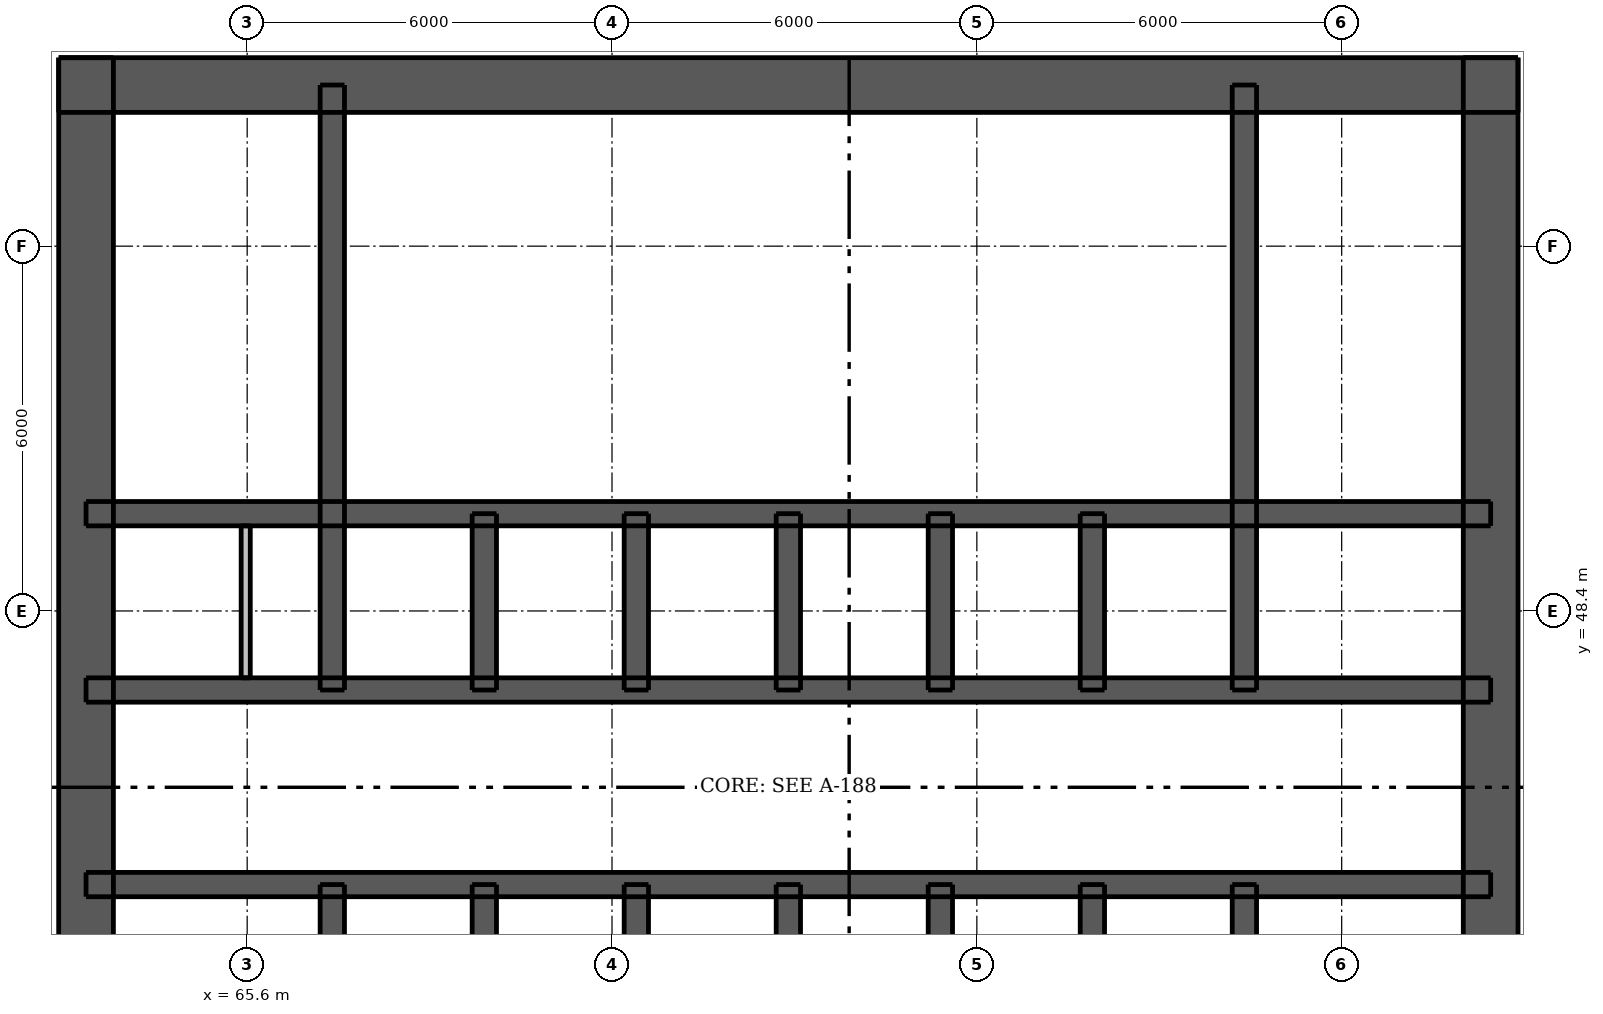
"""IFC4 building model, lengths in metres.
Left out: names, types, materials, properties, quantities, classifications, styles, units other than length and angle.
Written with IfcOpenShell. Run it as: python <this file> out.ifc"""

import sys

from ifc_helpers import new_model, si_unit, direction, frame, frame_2d, origin, place, context, subcontext, project, spatial, rectangle, extrude, element, fill, save


model = new_model("IFC4")
c1 = context("Model", 3, precision=1e-05, world=origin(), true_north=direction((0.0, 1.0)))
c2 = subcontext(c1, "Body", "Model", "MODEL_VIEW")
j1 = project(units=[si_unit("LENGTHUNIT", "METRE"), si_unit("PLANEANGLEUNIT", "RADIAN")], contexts=[c1])
p1 = place(None, origin())
s1 = spatial("IfcSite", under=j1, at=p1, CompositionType="ELEMENT")
p2 = place(p1, origin())
s2 = spatial("IfcBuilding", under=s1, at=p2, CompositionType="ELEMENT")
p3 = place(p2, frame((0.0, 0.0, 53.2)))
s3 = spatial("IfcBuildingStorey", under=s2, at=p3, CompositionType="ELEMENT", Elevation=53.2)
p4 = place(p3, frame((62.5, 57.05, 0.0), z_axis=(0.0, 0.0, 1.0), x_axis=(1.0, 0.0, 0.0)))
e1 = element("IfcWall", 1, at=p4, inside=s3, PredefinedType="SHEAR", context=c2, shape_type="SweptSolid", body=[
    extrude(rectangle(XDim=24.0, YDim=0.9, at=frame_2d((12.0, 0.0))), origin(), (0.0, 0.0, 1.0), 3.05),
])
p5 = place(p4, frame((20.85, 0.0, 0.0)))
e2 = element("IfcOpeningElement", 2, at=p5, cuts=e1, PredefinedType="OPENING", context=c2, shape_type="SweptSolid", body=[
    extrude(rectangle(XDim=1.1, YDim=2.1, at=frame_2d((0.55, 1.05))), frame((0.0, 0.46, 0.0), z_axis=(0.0, -1.0, 0.0), x_axis=(1.0, 0.0, 0.0)), (0.0, 0.0, 1.0), 0.92),
])
p6 = place(p4, frame((2.05, 0.0, 0.0)))
e3 = element("IfcOpeningElement", 3, at=p6, cuts=e1, PredefinedType="OPENING", context=c2, shape_type="SweptSolid", body=[
    extrude(rectangle(XDim=1.1, YDim=2.1, at=frame_2d((0.55, 1.05))), frame((0.0, 0.46, 0.0), z_axis=(0.0, -1.0, 0.0), x_axis=(1.0, 0.0, 0.0)), (0.0, 0.0, 1.0), 0.92),
])
p7 = place(p4, frame((11.55, 0.0, 0.0)))
e4 = element("IfcOpeningElement", 4, at=p7, cuts=e1, PredefinedType="OPENING", context=c2, shape_type="SweptSolid", body=[
    extrude(rectangle(XDim=0.9, YDim=2.1, at=frame_2d((0.45, 1.05))), frame((0.0, 0.46, 0.0), z_axis=(0.0, -1.0, 0.0), x_axis=(1.0, 0.0, 0.0)), (0.0, 0.0, 1.0), 0.92),
])
p8 = place(p3, frame((62.95, 33.5, 0.0), z_axis=(0.0, 0.0, 1.0), x_axis=(0.0, 1.0, 0.0)))
e5 = element("IfcWall", 5, at=p8, inside=s3, PredefinedType="SHEAR", context=c2, shape_type="SweptSolid", body=[
    extrude(rectangle(XDim=24.0, YDim=0.9, at=frame_2d((12.0, 0.0))), origin(), (0.0, 0.0, 1.0), 3.05),
])
p9 = place(p8, frame((11.2, 0.0, 0.0)))
e6 = element("IfcOpeningElement", 6, at=p9, cuts=e5, PredefinedType="OPENING", context=c2, shape_type="SweptSolid", body=[
    extrude(rectangle(XDim=1.6, YDim=2.1, at=frame_2d((0.8, 1.05))), frame((0.0, 0.46, 0.0), z_axis=(0.0, -1.0, 0.0), x_axis=(1.0, 0.0, 0.0)), (0.0, 0.0, 1.0), 0.92),
])
p10 = place(p3, frame((86.05, 33.5, 0.0), z_axis=(0.0, 0.0, 1.0), x_axis=(0.0, 1.0, 0.0)))
e7 = element("IfcWall", 7, at=p10, inside=s3, PredefinedType="SHEAR", context=c2, shape_type="SweptSolid", body=[
    extrude(rectangle(XDim=24.0, YDim=0.9, at=frame_2d((12.0, 0.0))), origin(), (0.0, 0.0, 1.0), 3.05),
])
p11 = place(p10, frame((11.2, 0.0, 0.0)))
e8 = element("IfcOpeningElement", 8, at=p11, cuts=e7, PredefinedType="OPENING", context=c2, shape_type="SweptSolid", body=[
    extrude(rectangle(XDim=1.6, YDim=2.1, at=frame_2d((0.8, 1.05))), frame((0.0, 0.46, 0.0), z_axis=(0.0, -1.0, 0.0), x_axis=(1.0, 0.0, 0.0)), (0.0, 0.0, 1.0), 0.92),
])
p12 = place(p3, frame((62.95, 43.9, 0.0), z_axis=(0.0, 0.0, 1.0), x_axis=(1.0, 0.0, 0.0)))
e9 = element("IfcWall", 9, at=p12, inside=s3, PredefinedType="SHEAR", context=c2, shape_type="SweptSolid", body=[
    extrude(rectangle(XDim=23.1, YDim=0.4, at=frame_2d((11.55, 0.0))), origin(), (0.0, 0.0, 1.0), 3.05),
])
p13 = place(p12, frame((1.7, 0.0, 0.0)))
e10 = element("IfcOpeningElement", 10, at=p13, cuts=e9, PredefinedType="OPENING", context=c2, shape_type="SweptSolid", body=[
    extrude(rectangle(XDim=0.9, YDim=2.1, at=frame_2d((0.45, 1.05))), frame((0.0, 0.21, 0.0), z_axis=(0.0, -1.0, 0.0), x_axis=(1.0, 0.0, 0.0)), (0.0, 0.0, 1.0), 0.42),
])
p14 = place(p12, frame((20.5, 0.0, 0.0)))
e11 = element("IfcOpeningElement", 11, at=p14, cuts=e9, PredefinedType="OPENING", context=c2, shape_type="SweptSolid", body=[
    extrude(rectangle(XDim=0.9, YDim=2.1, at=frame_2d((0.45, 1.05))), frame((0.0, 0.21, 0.0), z_axis=(0.0, -1.0, 0.0), x_axis=(1.0, 0.0, 0.0)), (0.0, 0.0, 1.0), 0.42),
])
p15 = place(p12, frame((4.75, 0.0, 0.0)))
e12 = element("IfcOpeningElement", 12, at=p15, cuts=e9, PredefinedType="OPENING", context=c2, shape_type="SweptSolid", body=[
    extrude(rectangle(XDim=1.1, YDim=2.1, at=frame_2d((0.55, 1.05))), frame((0.0, 0.21, 0.0), z_axis=(0.0, -1.0, 0.0), x_axis=(1.0, 0.0, 0.0)), (0.0, 0.0, 1.0), 0.42),
])
p16 = place(p12, frame((7.25, 0.0, 0.0)))
e13 = element("IfcOpeningElement", 13, at=p16, cuts=e9, PredefinedType="OPENING", context=c2, shape_type="SweptSolid", body=[
    extrude(rectangle(XDim=1.1, YDim=2.1, at=frame_2d((0.55, 1.05))), frame((0.0, 0.21, 0.0), z_axis=(0.0, -1.0, 0.0), x_axis=(1.0, 0.0, 0.0)), (0.0, 0.0, 1.0), 0.42),
])
p17 = place(p12, frame((9.75, 0.0, 0.0)))
e14 = element("IfcOpeningElement", 14, at=p17, cuts=e9, PredefinedType="OPENING", context=c2, shape_type="SweptSolid", body=[
    extrude(rectangle(XDim=1.1, YDim=2.1, at=frame_2d((0.55, 1.05))), frame((0.0, 0.21, 0.0), z_axis=(0.0, -1.0, 0.0), x_axis=(1.0, 0.0, 0.0)), (0.0, 0.0, 1.0), 0.42),
])
p18 = place(p12, frame((12.25, 0.0, 0.0)))
e15 = element("IfcOpeningElement", 15, at=p18, cuts=e9, PredefinedType="OPENING", context=c2, shape_type="SweptSolid", body=[
    extrude(rectangle(XDim=1.1, YDim=2.1, at=frame_2d((0.55, 1.05))), frame((0.0, 0.21, 0.0), z_axis=(0.0, -1.0, 0.0), x_axis=(1.0, 0.0, 0.0)), (0.0, 0.0, 1.0), 0.42),
])
p19 = place(p12, frame((14.75, 0.0, 0.0)))
e16 = element("IfcOpeningElement", 16, at=p19, cuts=e9, PredefinedType="OPENING", context=c2, shape_type="SweptSolid", body=[
    extrude(rectangle(XDim=1.1, YDim=2.1, at=frame_2d((0.55, 1.05))), frame((0.0, 0.21, 0.0), z_axis=(0.0, -1.0, 0.0), x_axis=(1.0, 0.0, 0.0)), (0.0, 0.0, 1.0), 0.42),
])
p20 = place(p12, frame((17.25, 0.0, 0.0)))
e17 = element("IfcOpeningElement", 17, at=p20, cuts=e9, PredefinedType="OPENING", context=c2, shape_type="SweptSolid", body=[
    extrude(rectangle(XDim=1.1, YDim=2.1, at=frame_2d((0.55, 1.05))), frame((0.0, 0.21, 0.0), z_axis=(0.0, -1.0, 0.0), x_axis=(1.0, 0.0, 0.0)), (0.0, 0.0, 1.0), 0.42),
])
p21 = place(p3, frame((62.95, 47.1, 0.0), z_axis=(0.0, 0.0, 1.0), x_axis=(1.0, 0.0, 0.0)))
e18 = element("IfcWall", 18, at=p21, inside=s3, PredefinedType="SHEAR", context=c2, shape_type="SweptSolid", body=[
    extrude(rectangle(XDim=23.1, YDim=0.4, at=frame_2d((11.55, 0.0))), origin(), (0.0, 0.0, 1.0), 3.05),
])
p22 = place(p21, frame((1.088, 0.0, 0.0)))
e19 = element("IfcOpeningElement", 19, at=p22, cuts=e18, PredefinedType="OPENING", context=c2, shape_type="SweptSolid", body=[
    extrude(rectangle(XDim=0.9, YDim=2.1, at=frame_2d((0.45, 1.05))), frame((0.0, 0.21, 0.0), z_axis=(0.0, -1.0, 0.0), x_axis=(1.0, 0.0, 0.0)), (0.0, 0.0, 1.0), 0.42),
])
p23 = place(p21, frame((2.838, 0.0, 0.0)))
e20 = element("IfcOpeningElement", 20, at=p23, cuts=e18, PredefinedType="OPENING", context=c2, shape_type="SweptSolid", body=[
    extrude(rectangle(XDim=0.8, YDim=2.1, at=frame_2d((0.4, 1.05))), frame((0.0, 0.21, 0.0), z_axis=(0.0, -1.0, 0.0), x_axis=(1.0, 0.0, 0.0)), (0.0, 0.0, 1.0), 0.42),
])
p24 = place(p21, frame((20.5, 0.0, 0.0)))
e21 = element("IfcOpeningElement", 21, at=p24, cuts=e18, PredefinedType="OPENING", context=c2, shape_type="SweptSolid", body=[
    extrude(rectangle(XDim=0.9, YDim=2.1, at=frame_2d((0.45, 1.05))), frame((0.0, 0.21, 0.0), z_axis=(0.0, -1.0, 0.0), x_axis=(1.0, 0.0, 0.0)), (0.0, 0.0, 1.0), 0.42),
])
p25 = place(p3, frame((62.95, 50.0, 0.0), z_axis=(0.0, 0.0, 1.0), x_axis=(1.0, 0.0, 0.0)))
e22 = element("IfcWall", 22, at=p25, inside=s3, PredefinedType="SHEAR", context=c2, shape_type="SweptSolid", body=[
    extrude(rectangle(XDim=23.1, YDim=0.4, at=frame_2d((11.55, 0.0))), origin(), (0.0, 0.0, 1.0), 3.05),
])
p26 = place(p3, frame((67.0, 33.95, 0.0), z_axis=(0.0, 0.0, 1.0), x_axis=(0.0, 1.0, 0.0)))
e23 = element("IfcWall", 23, at=p26, inside=s3, PredefinedType="SHEAR", context=c2, shape_type="SweptSolid", body=[
    extrude(rectangle(XDim=9.95, YDim=0.4, at=frame_2d((4.975, 0.0))), origin(), (0.0, 0.0, 1.0), 3.05),
])
p27 = place(p26, frame((0.65, 0.0, 0.0)))
e24 = element("IfcOpeningElement", 24, at=p27, cuts=e23, PredefinedType="OPENING", context=c2, shape_type="SweptSolid", body=[
    extrude(rectangle(XDim=1.1, YDim=2.1, at=frame_2d((0.55, 1.05))), frame((0.0, 0.21, 0.0), z_axis=(0.0, -1.0, 0.0), x_axis=(1.0, 0.0, 0.0)), (0.0, 0.0, 1.0), 0.42),
])
for number, where, z_axis, x_axis in (
    (25, (67.0, 47.1, 0.0), (0.0, 0.0, 1.0), (0.0, 1.0, 0.0)),
    (26, (82.0, 33.95, 0.0), (0.0, 0.0, 1.0), (0.0, 1.0, 0.0)),
    (27, (82.0, 47.1, 0.0), (0.0, 0.0, 1.0), (0.0, 1.0, 0.0)),
):
    element("IfcWall", number, at=place(p3, frame(where, z_axis=z_axis, x_axis=x_axis)), inside=s3, PredefinedType="SHEAR", context=c2, shape_type="SweptSolid", body=[
        extrude(rectangle(XDim=9.95, YDim=0.4, at=frame_2d((4.975, 0.0))), origin(), (0.0, 0.0, 1.0), 3.05),
    ])
for number, where, z_axis, x_axis in (
    (28, (69.5, 41.0, 0.0), (0.0, 0.0, 1.0), (0.0, 1.0, 0.0)),
    (29, (69.5, 47.1, 0.0), (0.0, 0.0, 1.0), (0.0, 1.0, 0.0)),
    (30, (72.0, 41.0, 0.0), (0.0, 0.0, 1.0), (0.0, 1.0, 0.0)),
    (31, (72.0, 47.1, 0.0), (0.0, 0.0, 1.0), (0.0, 1.0, 0.0)),
    (32, (74.5, 41.0, 0.0), (0.0, 0.0, 1.0), (0.0, 1.0, 0.0)),
    (33, (74.5, 47.1, 0.0), (0.0, 0.0, 1.0), (0.0, 1.0, 0.0)),
    (34, (77.0, 41.0, 0.0), (0.0, 0.0, 1.0), (0.0, 1.0, 0.0)),
    (35, (77.0, 47.1, 0.0), (0.0, 0.0, 1.0), (0.0, 1.0, 0.0)),
    (36, (79.5, 41.0, 0.0), (0.0, 0.0, 1.0), (0.0, 1.0, 0.0)),
    (37, (79.5, 47.1, 0.0), (0.0, 0.0, 1.0), (0.0, 1.0, 0.0)),
):
    element("IfcWall", number, at=place(p3, frame(where, z_axis=z_axis, x_axis=x_axis)), inside=s3, PredefinedType="SHEAR", context=c2, shape_type="SweptSolid", body=[
        extrude(rectangle(XDim=2.9, YDim=0.4, at=frame_2d((1.45, 0.0))), origin(), (0.0, 0.0, 1.0), 3.05),
    ])
p28 = place(p3, frame((65.576, 47.3, 0.0), z_axis=(0.0, 0.0, 1.0), x_axis=(0.0, 1.0, 0.0)))
e38 = element("IfcWall", 38, at=p28, inside=s3, PredefinedType="PLUMBINGWALL", context=c2, shape_type="SweptSolid", body=[
    extrude(rectangle(XDim=2.5, YDim=0.15, at=frame_2d((1.25, 0.0))), origin(), (0.0, 0.0, 1.0), 3.05),
])
p29 = place(p5, origin())
e39 = element("IfcDoor", 39, at=p29, inside=s3, OperationType="SINGLE_SWING_RIGHT", PredefinedType="DOOR", context=c2, shape_type="SweptSolid", body=[
    extrude(rectangle(XDim=1.1, YDim=2.1, at=frame_2d((0.55, 1.05))), frame((0.0, -0.388, 0.0), z_axis=(0.0, -1.0, 0.0), x_axis=(1.0, 0.0, 0.0)), (0.0, 0.0, 1.0), 0.05),
])
fill(e2, e39)
p30 = place(p6, origin())
e40 = element("IfcDoor", 40, at=p30, inside=s3, OperationType="SINGLE_SWING_LEFT", PredefinedType="DOOR", context=c2, shape_type="SweptSolid", body=[
    extrude(rectangle(XDim=1.1, YDim=2.1, at=frame_2d((0.55, 1.05))), frame((0.0, -0.388, 0.0), z_axis=(0.0, -1.0, 0.0), x_axis=(1.0, 0.0, 0.0)), (0.0, 0.0, 1.0), 0.05),
])
fill(e3, e40)
p31 = place(p9, origin())
e41 = element("IfcDoor", 41, at=p31, inside=s3, OperationType="DOUBLE_DOOR_SINGLE_SWING", PredefinedType="DOOR", context=c2, shape_type="SweptSolid", body=[
    extrude(rectangle(XDim=1.6, YDim=2.1, at=frame_2d((0.8, 1.05))), frame((0.0, -0.388, 0.0), z_axis=(0.0, -1.0, 0.0), x_axis=(1.0, 0.0, 0.0)), (0.0, 0.0, 1.0), 0.05),
])
fill(e6, e41)
p32 = place(p11, origin())
e42 = element("IfcDoor", 42, at=p32, inside=s3, OperationType="DOUBLE_DOOR_SINGLE_SWING", PredefinedType="DOOR", context=c2, shape_type="SweptSolid", body=[
    extrude(rectangle(XDim=1.6, YDim=2.1, at=frame_2d((0.8, 1.05))), frame((0.0, 0.438, 0.0), z_axis=(0.0, -1.0, 0.0), x_axis=(1.0, 0.0, 0.0)), (0.0, 0.0, 1.0), 0.05),
])
fill(e8, e42)
p33 = place(p13, origin())
e43 = element("IfcDoor", 43, at=p33, inside=s3, OperationType="SINGLE_SWING_LEFT", PredefinedType="DOOR", context=c2, shape_type="SweptSolid", body=[
    extrude(rectangle(XDim=0.9, YDim=2.1, at=frame_2d((0.45, 1.05))), frame((0.0, -0.138, 0.0), z_axis=(0.0, -1.0, 0.0), x_axis=(1.0, 0.0, 0.0)), (0.0, 0.0, 1.0), 0.05),
])
fill(e10, e43)
p34 = place(p14, origin())
e44 = element("IfcDoor", 44, at=p34, inside=s3, OperationType="SINGLE_SWING_LEFT", PredefinedType="DOOR", context=c2, shape_type="SweptSolid", body=[
    extrude(rectangle(XDim=0.9, YDim=2.1, at=frame_2d((0.45, 1.05))), frame((0.0, -0.138, 0.0), z_axis=(0.0, -1.0, 0.0), x_axis=(1.0, 0.0, 0.0)), (0.0, 0.0, 1.0), 0.05),
])
fill(e11, e44)
p35 = place(p22, origin())
e45 = element("IfcDoor", 45, at=p35, inside=s3, OperationType="SINGLE_SWING_LEFT", PredefinedType="DOOR", context=c2, shape_type="SweptSolid", body=[
    extrude(rectangle(XDim=0.9, YDim=2.1, at=frame_2d((0.45, 1.05))), frame((0.0, 0.188, 0.0), z_axis=(0.0, -1.0, 0.0), x_axis=(1.0, 0.0, 0.0)), (0.0, 0.0, 1.0), 0.05),
])
fill(e19, e45)
p36 = place(p23, origin())
e46 = element("IfcDoor", 46, at=p36, inside=s3, OperationType="SINGLE_SWING_RIGHT", PredefinedType="DOOR", context=c2, shape_type="SweptSolid", body=[
    extrude(rectangle(XDim=0.8, YDim=2.1, at=frame_2d((0.4, 1.05))), frame((0.0, 0.188, 0.0), z_axis=(0.0, -1.0, 0.0), x_axis=(1.0, 0.0, 0.0)), (0.0, 0.0, 1.0), 0.05),
])
fill(e20, e46)
p37 = place(p24, origin())
e47 = element("IfcDoor", 47, at=p37, inside=s3, OperationType="SINGLE_SWING_LEFT", PredefinedType="DOOR", context=c2, shape_type="SweptSolid", body=[
    extrude(rectangle(XDim=0.9, YDim=2.1, at=frame_2d((0.45, 1.05))), frame((0.0, 0.188, 0.0), z_axis=(0.0, -1.0, 0.0), x_axis=(1.0, 0.0, 0.0)), (0.0, 0.0, 1.0), 0.05),
])
fill(e21, e47)
p38 = place(p7, origin())
e48 = element("IfcDoor", 48, at=p38, inside=s3, OperationType="SINGLE_SWING_RIGHT", PredefinedType="DOOR", context=c2, shape_type="SweptSolid", body=[
    extrude(rectangle(XDim=0.9, YDim=2.1, at=frame_2d((0.45, 1.05))), frame((0.0, -0.388, 0.0), z_axis=(0.0, -1.0, 0.0), x_axis=(1.0, 0.0, 0.0)), (0.0, 0.0, 1.0), 0.05),
])
fill(e4, e48)
p39 = place(p15, origin())
e49 = element("IfcDoor", 49, at=p39, inside=s3, OperationType="DOUBLE_DOOR_SLIDING", PredefinedType="DOOR", context=c2, shape_type="SweptSolid", body=[
    extrude(rectangle(XDim=1.1, YDim=2.1, at=frame_2d((0.55, 1.05))), frame((0.0, 0.025, 0.0), z_axis=(0.0, -1.0, 0.0), x_axis=(1.0, 0.0, 0.0)), (0.0, 0.0, 1.0), 0.05),
])
fill(e12, e49)
p40 = place(p16, origin())
e50 = element("IfcDoor", 50, at=p40, inside=s3, OperationType="DOUBLE_DOOR_SLIDING", PredefinedType="DOOR", context=c2, shape_type="SweptSolid", body=[
    extrude(rectangle(XDim=1.1, YDim=2.1, at=frame_2d((0.55, 1.05))), frame((0.0, 0.025, 0.0), z_axis=(0.0, -1.0, 0.0), x_axis=(1.0, 0.0, 0.0)), (0.0, 0.0, 1.0), 0.05),
])
fill(e13, e50)
p41 = place(p17, origin())
e51 = element("IfcDoor", 51, at=p41, inside=s3, OperationType="DOUBLE_DOOR_SLIDING", PredefinedType="DOOR", context=c2, shape_type="SweptSolid", body=[
    extrude(rectangle(XDim=1.1, YDim=2.1, at=frame_2d((0.55, 1.05))), frame((0.0, 0.025, 0.0), z_axis=(0.0, -1.0, 0.0), x_axis=(1.0, 0.0, 0.0)), (0.0, 0.0, 1.0), 0.05),
])
fill(e14, e51)
p42 = place(p18, origin())
e52 = element("IfcDoor", 52, at=p42, inside=s3, OperationType="DOUBLE_DOOR_SLIDING", PredefinedType="DOOR", context=c2, shape_type="SweptSolid", body=[
    extrude(rectangle(XDim=1.1, YDim=2.1, at=frame_2d((0.55, 1.05))), frame((0.0, 0.025, 0.0), z_axis=(0.0, -1.0, 0.0), x_axis=(1.0, 0.0, 0.0)), (0.0, 0.0, 1.0), 0.05),
])
fill(e15, e52)
p43 = place(p19, origin())
e53 = element("IfcDoor", 53, at=p43, inside=s3, OperationType="DOUBLE_DOOR_SLIDING", PredefinedType="DOOR", context=c2, shape_type="SweptSolid", body=[
    extrude(rectangle(XDim=1.1, YDim=2.1, at=frame_2d((0.55, 1.05))), frame((0.0, 0.025, 0.0), z_axis=(0.0, -1.0, 0.0), x_axis=(1.0, 0.0, 0.0)), (0.0, 0.0, 1.0), 0.05),
])
fill(e16, e53)
p44 = place(p20, origin())
e54 = element("IfcDoor", 54, at=p44, inside=s3, OperationType="DOUBLE_DOOR_SLIDING", PredefinedType="DOOR", context=c2, shape_type="SweptSolid", body=[
    extrude(rectangle(XDim=1.1, YDim=2.1, at=frame_2d((0.55, 1.05))), frame((0.0, 0.025, 0.0), z_axis=(0.0, -1.0, 0.0), x_axis=(1.0, 0.0, 0.0)), (0.0, 0.0, 1.0), 0.05),
])
fill(e17, e54)
save(model, sys.argv[1])
